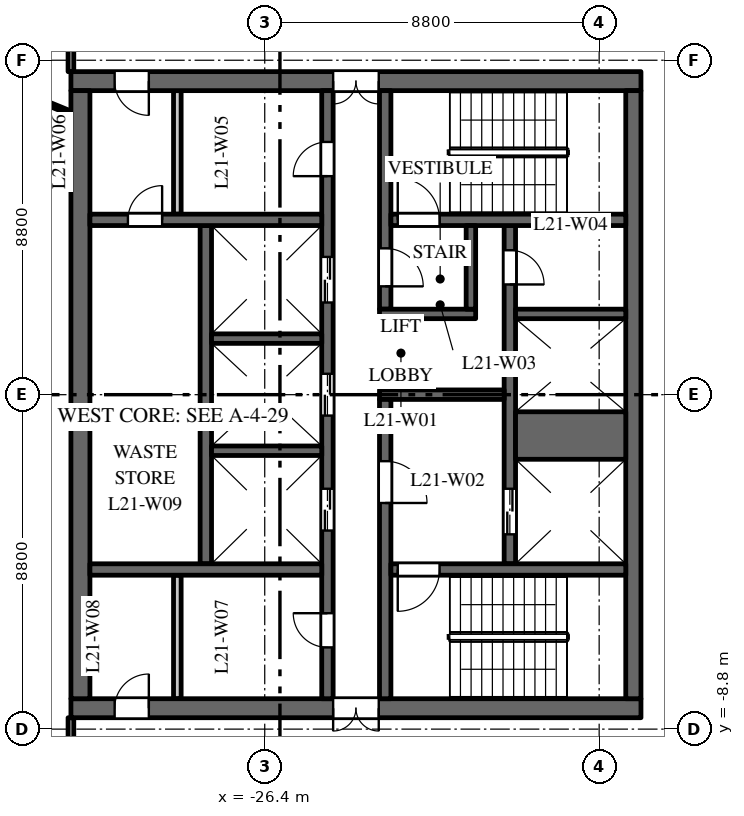
"""IFC4 building model, lengths in metres.
Left out: names, types, materials, properties, quantities, classifications, styles, units other than length and angle.
Written with IfcOpenShell. Run it as: python <this file> out.ifc"""

import sys

from ifc_helpers import new_model, si_unit, direction, frame, frame_2d, origin, place, context, subcontext, project, spatial, rectangle, extrude, element, fill, save


model = new_model("IFC4")
c1 = context("Model", 3, precision=1e-05, world=origin(), true_north=direction((0.0, 1.0)))
c2 = subcontext(c1, "Body", "Model", "MODEL_VIEW")
j1 = project(units=[si_unit("LENGTHUNIT", "METRE"), si_unit("PLANEANGLEUNIT", "RADIAN")], contexts=[c1])
p1 = place(None, origin())
s1 = spatial("IfcSite", under=j1, at=p1, CompositionType="ELEMENT")
p2 = place(p1, origin())
s2 = spatial("IfcBuilding", under=s1, at=p2, CompositionType="ELEMENT")
p3 = place(p2, frame((0.0, 0.0, 96.0)))
s3 = spatial("IfcBuildingStorey", under=s2, at=p3, CompositionType="ELEMENT", Elevation=96.0)
p4 = place(p3, frame((-16.5, 8.25, 0.0), z_axis=(0.0, 0.0, 1.0), x_axis=(-1.0, 0.0, 0.0)))
e1 = element("IfcWall", 1, at=p4, inside=s3, PredefinedType="SHEAR", context=c2, shape_type="SweptSolid", body=[
    extrude(rectangle(XDim=15.0, YDim=0.5, at=frame_2d((7.5, 0.0))), origin(), (0.0, 0.0, 1.0), 3.7),
])
p5 = place(p4, frame((6.9, 0.0, 0.0)))
e2 = element("IfcOpeningElement", 2, at=p5, cuts=e1, PredefinedType="OPENING", context=c2, shape_type="SweptSolid", body=[
    extrude(rectangle(XDim=1.2, YDim=2.1, at=frame_2d((0.6, 1.05))), frame((0.0, 0.26, 0.0), z_axis=(0.0, -1.0, 0.0), x_axis=(1.0, 0.0, 0.0)), (0.0, 0.0, 1.0), 0.52),
])
p6 = place(p4, frame((12.95, 0.0, 0.0)))
e3 = element("IfcOpeningElement", 3, at=p6, cuts=e1, PredefinedType="OPENING", context=c2, shape_type="SweptSolid", body=[
    extrude(rectangle(XDim=0.9, YDim=2.1, at=frame_2d((0.45, 1.05))), frame((0.0, 0.26, 0.0), z_axis=(0.0, -1.0, 0.0), x_axis=(1.0, 0.0, 0.0)), (0.0, 0.0, 1.0), 0.52),
])
p7 = place(p3, frame((-16.5, -8.25, 0.0), z_axis=(0.0, 0.0, 1.0), x_axis=(-1.0, 0.0, 0.0)))
e4 = element("IfcWall", 4, at=p7, inside=s3, PredefinedType="SHEAR", context=c2, shape_type="SweptSolid", body=[
    extrude(rectangle(XDim=15.0, YDim=0.5, at=frame_2d((7.5, 0.0))), origin(), (0.0, 0.0, 1.0), 3.7),
])
p8 = place(p7, frame((6.9, 0.0, 0.0)))
e5 = element("IfcOpeningElement", 5, at=p8, cuts=e4, PredefinedType="OPENING", context=c2, shape_type="SweptSolid", body=[
    extrude(rectangle(XDim=1.2, YDim=2.1, at=frame_2d((0.6, 1.05))), frame((0.0, 0.26, 0.0), z_axis=(0.0, -1.0, 0.0), x_axis=(1.0, 0.0, 0.0)), (0.0, 0.0, 1.0), 0.52),
])
p9 = place(p7, frame((12.95, 0.0, 0.0)))
e6 = element("IfcOpeningElement", 6, at=p9, cuts=e4, PredefinedType="OPENING", context=c2, shape_type="SweptSolid", body=[
    extrude(rectangle(XDim=0.9, YDim=2.1, at=frame_2d((0.45, 1.05))), frame((0.0, 0.26, 0.0), z_axis=(0.0, -1.0, 0.0), x_axis=(1.0, 0.0, 0.0)), (0.0, 0.0, 1.0), 0.52),
])
p10 = place(p3, frame((-27.95, -4.45, 0.0), z_axis=(0.0, 0.0, 1.0), x_axis=(0.0, 1.0, 0.0)))
e7 = element("IfcWall", 7, at=p10, inside=s3, PredefinedType="SHEAR", context=c2, shape_type="SweptSolid", body=[
    extrude(rectangle(XDim=8.9, YDim=0.3, at=frame_2d((4.45, 0.0))), origin(), (0.0, 0.0, 1.0), 3.7),
])
p11 = place(p3, frame((-19.95, -4.45, 0.0), z_axis=(0.0, 0.0, 1.0), x_axis=(0.0, 1.0, 0.0)))
e8 = element("IfcWall", 8, at=p11, inside=s3, PredefinedType="SHEAR", context=c2, shape_type="SweptSolid", body=[
    extrude(rectangle(XDim=8.9, YDim=0.3, at=frame_2d((4.45, 0.0))), origin(), (0.0, 0.0, 1.0), 3.7),
])
p12 = place(p11, frame((0.775, 0.0, 0.0)))
e9 = element("IfcOpeningElement", 9, at=p12, cuts=e8, PredefinedType="OPENING", context=c2, shape_type="SweptSolid", body=[
    extrude(rectangle(XDim=1.2, YDim=2.1, at=frame_2d((0.6, 1.05))), frame((0.0, 0.16, 0.0), z_axis=(0.0, -1.0, 0.0), x_axis=(1.0, 0.0, 0.0)), (0.0, 0.0, 1.0), 0.32),
])
p13 = place(p11, frame((7.35, 0.0, 0.0)))
e10 = element("IfcOpeningElement", 10, at=p13, cuts=e8, PredefinedType="OPENING", context=c2, shape_type="SweptSolid", body=[
    extrude(rectangle(XDim=0.9, YDim=2.1, at=frame_2d((0.45, 1.05))), frame((0.0, 0.16, 0.0), z_axis=(0.0, -1.0, 0.0), x_axis=(1.0, 0.0, 0.0)), (0.0, 0.0, 1.0), 0.32),
])
p14 = place(p3, frame((-24.75, -8.0, 0.0), z_axis=(0.0, 0.0, 1.0), x_axis=(0.0, 1.0, 0.0)))
e11 = element("IfcWall", 11, at=p14, inside=s3, PredefinedType="SHEAR", context=c2, shape_type="SweptSolid", body=[
    extrude(rectangle(XDim=16.0, YDim=0.3, at=frame_2d((8.0, 0.0))), origin(), (0.0, 0.0, 1.0), 3.7),
])
p15 = place(p14, frame((4.425, 0.0, 0.0)))
e12 = element("IfcOpeningElement", 12, at=p15, cuts=e11, PredefinedType="OPENING", context=c2, shape_type="SweptSolid", body=[
    extrude(rectangle(XDim=1.1, YDim=2.1, at=frame_2d((0.55, 1.05))), frame((0.0, 0.16, 0.0), z_axis=(0.0, -1.0, 0.0), x_axis=(1.0, 0.0, 0.0)), (0.0, 0.0, 1.0), 0.32),
])
p16 = place(p14, frame((7.45, 0.0, 0.0)))
e13 = element("IfcOpeningElement", 13, at=p16, cuts=e11, PredefinedType="OPENING", context=c2, shape_type="SweptSolid", body=[
    extrude(rectangle(XDim=1.1, YDim=2.1, at=frame_2d((0.55, 1.05))), frame((0.0, 0.16, 0.0), z_axis=(0.0, -1.0, 0.0), x_axis=(1.0, 0.0, 0.0)), (0.0, 0.0, 1.0), 0.32),
])
p17 = place(p14, frame((10.425, 0.0, 0.0)))
e14 = element("IfcOpeningElement", 14, at=p17, cuts=e11, PredefinedType="OPENING", context=c2, shape_type="SweptSolid", body=[
    extrude(rectangle(XDim=1.2, YDim=2.1, at=frame_2d((0.6, 1.05))), frame((0.0, 0.16, 0.0), z_axis=(0.0, -1.0, 0.0), x_axis=(1.0, 0.0, 0.0)), (0.0, 0.0, 1.0), 0.32),
])
p18 = place(p14, frame((13.75, 0.0, 0.0)))
e15 = element("IfcOpeningElement", 15, at=p18, cuts=e11, PredefinedType="OPENING", context=c2, shape_type="SweptSolid", body=[
    extrude(rectangle(XDim=0.9, YDim=2.1, at=frame_2d((0.45, 1.05))), frame((0.0, 0.16, 0.0), z_axis=(0.0, -1.0, 0.0), x_axis=(1.0, 0.0, 0.0)), (0.0, 0.0, 1.0), 0.32),
])
p19 = place(p14, frame((1.35, 0.0, 0.0)))
e16 = element("IfcOpeningElement", 16, at=p19, cuts=e11, PredefinedType="OPENING", context=c2, shape_type="SweptSolid", body=[
    extrude(rectangle(XDim=0.9, YDim=2.1, at=frame_2d((0.45, 1.05))), frame((0.0, 0.16, 0.0), z_axis=(0.0, -1.0, 0.0), x_axis=(1.0, 0.0, 0.0)), (0.0, 0.0, 1.0), 0.32),
])
p20 = place(p3, frame((-20.1, 0.0, 0.0), z_axis=(0.0, 0.0, 1.0), x_axis=(-1.0, 0.0, 0.0)))
e17 = element("IfcWall", 17, at=p20, inside=s3, PredefinedType="SHEAR", context=c2, shape_type="SweptSolid", body=[
    extrude(rectangle(XDim=3.28, YDim=0.25, at=frame_2d((1.64, 0.0))), origin(), (0.0, 0.0, 1.0), 3.7),
])
p21 = place(p3, frame((-16.7, -8.0, 0.0), z_axis=(0.0, 0.0, 1.0), x_axis=(0.0, 1.0, 0.0)))
e18 = element("IfcWall", 18, at=p21, inside=s3, PredefinedType="SHEAR", context=c2, shape_type="SweptSolid", body=[
    extrude(rectangle(XDim=16.0, YDim=0.4, at=frame_2d((8.0, 0.0))), origin(), (0.0, 0.0, 1.0), 3.7),
])
p22 = place(p3, frame((-31.25, -8.0, 0.0), z_axis=(0.0, 0.0, 1.0), x_axis=(0.0, 1.0, 0.0)))
e19 = element("IfcWall", 19, at=p22, inside=s3, PredefinedType="SHEAR", context=c2, shape_type="SweptSolid", body=[
    extrude(rectangle(XDim=16.0, YDim=0.5, at=frame_2d((8.0, 0.0))), origin(), (0.0, 0.0, 1.0), 3.7),
])
p23 = place(p3, frame((-24.9, 4.6, 0.0), z_axis=(0.0, 0.0, 1.0), x_axis=(-1.0, 0.0, 0.0)))
e20 = element("IfcWall", 20, at=p23, inside=s3, PredefinedType="SHEAR", context=c2, shape_type="SweptSolid", body=[
    extrude(rectangle(XDim=6.1, YDim=0.3, at=frame_2d((3.05, 0.0))), origin(), (0.0, 0.0, 1.0), 3.7),
])
p24 = place(p23, frame((4.2, 0.0, 0.0)))
e21 = element("IfcOpeningElement", 21, at=p24, cuts=e20, PredefinedType="OPENING", context=c2, shape_type="SweptSolid", body=[
    extrude(rectangle(XDim=0.9, YDim=2.1, at=frame_2d((0.45, 1.05))), frame((0.0, 0.16, 0.0), z_axis=(0.0, -1.0, 0.0), x_axis=(1.0, 0.0, 0.0)), (0.0, 0.0, 1.0), 0.32),
])
for number, where, z_axis, x_axis in (
    (22, (-28.7, 4.75, 0.0), (0.0, 0.0, 1.0), (0.0, 1.0, 0.0)),
    (23, (-28.7, -8.0, 0.0), (0.0, 0.0, 1.0), (0.0, 1.0, 0.0)),
):
    element("IfcWall", number, at=place(p3, frame(where, z_axis=z_axis, x_axis=x_axis)), inside=s3, PredefinedType="PARTITIONING", context=c2, shape_type="SweptSolid", body=[
        extrude(rectangle(XDim=3.25, YDim=0.2, at=frame_2d((1.625, 0.0))), origin(), (0.0, 0.0, 1.0), 3.7),
    ])
p25 = place(p3, frame((-24.9, -4.6, 0.0), z_axis=(0.0, 0.0, 1.0), x_axis=(-1.0, 0.0, 0.0)))
e24 = element("IfcWall", 24, at=p25, inside=s3, PredefinedType="SHEAR", context=c2, shape_type="SweptSolid", body=[
    extrude(rectangle(XDim=6.1, YDim=0.3, at=frame_2d((3.05, 0.0))), origin(), (0.0, 0.0, 1.0), 3.7),
])
p26 = place(p3, frame((-16.9, -1.075, 0.0), z_axis=(0.0, 0.0, 1.0), x_axis=(-1.0, 0.0, 0.0)))
e25 = element("IfcWall", 25, at=p26, inside=s3, PredefinedType="SHEAR", context=c2, shape_type="SweptSolid", body=[
    extrude(rectangle(XDim=2.9, YDim=1.25, at=frame_2d((1.45, 0.0))), origin(), (0.0, 0.0, 1.0), 3.7),
])
for number, where, z_axis, x_axis in (
    (26, (-16.9, 2.125, 0.0), (0.0, 0.0, 1.0), (-1.0, 0.0, 0.0)),
    (27, (-24.9, -1.475, 0.0), (0.0, 0.0, 1.0), (-1.0, 0.0, 0.0)),
    (28, (-24.9, 1.475, 0.0), (0.0, 0.0, 1.0), (-1.0, 0.0, 0.0)),
):
    element("IfcWall", number, at=place(p3, frame(where, z_axis=z_axis, x_axis=x_axis)), inside=s3, PredefinedType="SHEAR", context=c2, shape_type="SweptSolid", body=[
        extrude(rectangle(XDim=2.9, YDim=0.25, at=frame_2d((1.45, 0.0))), origin(), (0.0, 0.0, 1.0), 3.7),
    ])
p27 = place(p3, frame((-23.23, 2.25, 0.0), z_axis=(0.0, 0.0, 1.0), x_axis=(0.0, 1.0, 0.0)))
e29 = element("IfcWall", 29, at=p27, inside=s3, PredefinedType="SHEAR", context=c2, shape_type="SweptSolid", body=[
    extrude(rectangle(XDim=5.75, YDim=0.3, at=frame_2d((2.875, 0.0))), origin(), (0.0, 0.0, 1.0), 3.7),
])
p28 = place(p27, frame((0.6, 0.0, 0.0)))
e30 = element("IfcOpeningElement", 30, at=p28, cuts=e29, PredefinedType="OPENING", context=c2, shape_type="SweptSolid", body=[
    extrude(rectangle(XDim=1.0, YDim=2.1, at=frame_2d((0.5, 1.05))), frame((0.0, 0.16, 0.0), z_axis=(0.0, -1.0, 0.0), x_axis=(1.0, 0.0, 0.0)), (0.0, 0.0, 1.0), 0.32),
])
p29 = place(p3, frame((-23.23, -8.0, 0.0), z_axis=(0.0, 0.0, 1.0), x_axis=(0.0, 1.0, 0.0)))
e31 = element("IfcWall", 31, at=p29, inside=s3, PredefinedType="SHEAR", context=c2, shape_type="SweptSolid", body=[
    extrude(rectangle(XDim=7.875, YDim=0.3, at=frame_2d((3.938, 0.0))), origin(), (0.0, 0.0, 1.0), 3.7),
])
p30 = place(p29, frame((5.15, 0.0, 0.0)))
e32 = element("IfcOpeningElement", 32, at=p30, cuts=e31, PredefinedType="OPENING", context=c2, shape_type="SweptSolid", body=[
    extrude(rectangle(XDim=1.1, YDim=2.1, at=frame_2d((0.55, 1.05))), frame((0.0, 0.16, 0.0), z_axis=(0.0, -1.0, 0.0), x_axis=(1.0, 0.0, 0.0)), (0.0, 0.0, 1.0), 0.32),
])
p31 = place(p3, frame((-16.9, 4.6, 0.0), z_axis=(0.0, 0.0, 1.0), x_axis=(-1.0, 0.0, 0.0)))
e33 = element("IfcWall", 33, at=p31, inside=s3, PredefinedType="SHEAR", context=c2, shape_type="SweptSolid", body=[
    extrude(rectangle(XDim=6.18, YDim=0.3, at=frame_2d((3.09, 0.0))), origin(), (0.0, 0.0, 1.0), 3.7),
])
p32 = place(p31, frame((4.9, 0.0, 0.0)))
e34 = element("IfcOpeningElement", 34, at=p32, cuts=e33, PredefinedType="OPENING", context=c2, shape_type="SweptSolid", body=[
    extrude(rectangle(XDim=1.1, YDim=2.1, at=frame_2d((0.55, 1.05))), frame((0.0, 0.16, 0.0), z_axis=(0.0, -1.0, 0.0), x_axis=(1.0, 0.0, 0.0)), (0.0, 0.0, 1.0), 0.32),
])
p33 = place(p3, frame((-16.9, -4.6, 0.0), z_axis=(0.0, 0.0, 1.0), x_axis=(-1.0, 0.0, 0.0)))
e35 = element("IfcWall", 35, at=p33, inside=s3, PredefinedType="SHEAR", context=c2, shape_type="SweptSolid", body=[
    extrude(rectangle(XDim=6.18, YDim=0.3, at=frame_2d((3.09, 0.0))), origin(), (0.0, 0.0, 1.0), 3.7),
])
p34 = place(p33, frame((4.9, 0.0, 0.0)))
e36 = element("IfcOpeningElement", 36, at=p34, cuts=e35, PredefinedType="OPENING", context=c2, shape_type="SweptSolid", body=[
    extrude(rectangle(XDim=1.1, YDim=2.1, at=frame_2d((0.55, 1.05))), frame((0.0, 0.16, 0.0), z_axis=(0.0, -1.0, 0.0), x_axis=(1.0, 0.0, 0.0)), (0.0, 0.0, 1.0), 0.32),
])
p35 = place(p3, frame((-20.85, 2.125, 0.0), z_axis=(0.0, 0.0, 1.0), x_axis=(-1.0, 0.0, 0.0)))
e37 = element("IfcWall", 37, at=p35, inside=s3, PredefinedType="SHEAR", context=c2, shape_type="SweptSolid", body=[
    extrude(rectangle(XDim=2.53, YDim=0.25, at=frame_2d((1.265, 0.0))), origin(), (0.0, 0.0, 1.0), 3.7),
])
p36 = place(p3, frame((-20.975, 2.25, 0.0), z_axis=(0.0, 0.0, 1.0), x_axis=(0.0, 1.0, 0.0)))
e38 = element("IfcWall", 38, at=p36, inside=s3, PredefinedType="SHEAR", context=c2, shape_type="SweptSolid", body=[
    extrude(rectangle(XDim=2.2, YDim=0.25, at=frame_2d((1.1, 0.0))), origin(), (0.0, 0.0, 1.0), 3.7),
])
p37 = place(p3, frame((-34.234, 8.53, 0.0), z_axis=(0.0, 0.0, 1.0), x_axis=(0.925344112436, -0.379128307542, 0.0)))
e39 = element("IfcWall", 39, at=p37, inside=s3, PredefinedType="PARTITIONING", context=c2, shape_type="SweptSolid", body=[
    extrude(rectangle(XDim=2.954, YDim=0.1, at=frame_2d((1.477, 0.0))), origin(), (0.0, 0.0, 1.0), 2.9),
])
for number, where, z_axis, x_axis in (
    (40, (-31.5, -10.7, 0.0), (0.0, 0.0, 1.0), (0.0, 1.0, 0.0)),
    (41, (-31.5, 8.5, 0.0), (0.0, 0.0, 1.0), (0.0, 1.0, 0.0)),
):
    element("IfcWall", number, at=place(p3, frame(where, z_axis=z_axis, x_axis=x_axis)), inside=s3, PredefinedType="PARTITIONING", context=c2, shape_type="SweptSolid", body=[
        extrude(rectangle(XDim=2.2, YDim=0.15, at=frame_2d((1.1, 0.0))), origin(), (0.0, 0.0, 1.0), 3.7),
    ])
p38 = place(p12, origin())
e42 = element("IfcDoor", 42, at=p38, inside=s3, OperationType="DOUBLE_DOOR_SLIDING", PredefinedType="DOOR", context=c2, shape_type="SweptSolid", body=[
    extrude(rectangle(XDim=1.2, YDim=2.1, at=frame_2d((0.6, 1.05))), frame((0.0, 0.025, 0.0), z_axis=(0.0, -1.0, 0.0), x_axis=(1.0, 0.0, 0.0)), (0.0, 0.0, 1.0), 0.05),
])
fill(e9, e42)
p39 = place(p15, origin())
e43 = element("IfcDoor", 43, at=p39, inside=s3, OperationType="DOUBLE_DOOR_SLIDING", PredefinedType="DOOR", context=c2, shape_type="SweptSolid", body=[
    extrude(rectangle(XDim=1.1, YDim=2.1, at=frame_2d((0.55, 1.05))), frame((0.0, 0.025, 0.0), z_axis=(0.0, -1.0, 0.0), x_axis=(1.0, 0.0, 0.0)), (0.0, 0.0, 1.0), 0.05),
])
fill(e12, e43)
p40 = place(p16, origin())
e44 = element("IfcDoor", 44, at=p40, inside=s3, OperationType="DOUBLE_DOOR_SLIDING", PredefinedType="DOOR", context=c2, shape_type="SweptSolid", body=[
    extrude(rectangle(XDim=1.1, YDim=2.1, at=frame_2d((0.55, 1.05))), frame((0.0, 0.025, 0.0), z_axis=(0.0, -1.0, 0.0), x_axis=(1.0, 0.0, 0.0)), (0.0, 0.0, 1.0), 0.05),
])
fill(e13, e44)
p41 = place(p17, origin())
e45 = element("IfcDoor", 45, at=p41, inside=s3, OperationType="DOUBLE_DOOR_SLIDING", PredefinedType="DOOR", context=c2, shape_type="SweptSolid", body=[
    extrude(rectangle(XDim=1.2, YDim=2.1, at=frame_2d((0.6, 1.05))), frame((0.0, 0.025, 0.0), z_axis=(0.0, -1.0, 0.0), x_axis=(1.0, 0.0, 0.0)), (0.0, 0.0, 1.0), 0.05),
])
fill(e14, e45)
p42 = place(p32, origin())
e46 = element("IfcDoor", 46, at=p42, inside=s3, OperationType="SINGLE_SWING_RIGHT", PredefinedType="DOOR", context=c2, shape_type="SweptSolid", body=[
    extrude(rectangle(XDim=1.1, YDim=2.1, at=frame_2d((0.55, 1.05))), frame((0.0, 0.025, 0.0), z_axis=(0.0, -1.0, 0.0), x_axis=(1.0, 0.0, 0.0)), (0.0, 0.0, 1.0), 0.05),
])
fill(e34, e46)
p43 = place(p34, origin())
e47 = element("IfcDoor", 47, at=p43, inside=s3, OperationType="SINGLE_SWING_LEFT", PredefinedType="DOOR", context=c2, shape_type="SweptSolid", body=[
    extrude(rectangle(XDim=1.1, YDim=2.1, at=frame_2d((0.55, 1.05))), frame((0.0, 0.025, 0.0), z_axis=(0.0, -1.0, 0.0), x_axis=(1.0, 0.0, 0.0)), (0.0, 0.0, 1.0), 0.05),
])
fill(e36, e47)
p44 = place(p30, origin())
e48 = element("IfcDoor", 48, at=p44, inside=s3, OperationType="SINGLE_SWING_LEFT", PredefinedType="DOOR", context=c2, shape_type="SweptSolid", body=[
    extrude(rectangle(XDim=1.1, YDim=2.1, at=frame_2d((0.55, 1.05))), frame((0.0, 0.025, 0.0), z_axis=(0.0, -1.0, 0.0), x_axis=(1.0, 0.0, 0.0)), (0.0, 0.0, 1.0), 0.05),
])
fill(e32, e48)
p45 = place(p28, origin())
e49 = element("IfcDoor", 49, at=p45, inside=s3, OperationType="SINGLE_SWING_LEFT", PredefinedType="DOOR", context=c2, shape_type="SweptSolid", body=[
    extrude(rectangle(XDim=1.0, YDim=2.1, at=frame_2d((0.5, 1.05))), frame((0.0, 0.025, 0.0), z_axis=(0.0, -1.0, 0.0), x_axis=(1.0, 0.0, 0.0)), (0.0, 0.0, 1.0), 0.05),
])
fill(e30, e49)
p46 = place(p5, origin())
e50 = element("IfcDoor", 50, at=p46, inside=s3, OperationType="DOUBLE_DOOR_DOUBLE_SWING", PredefinedType="DOOR", context=c2, shape_type="SweptSolid", body=[
    extrude(rectangle(XDim=1.2, YDim=2.1, at=frame_2d((0.6, 1.05))), frame((0.0, 0.025, 0.0), z_axis=(0.0, -1.0, 0.0), x_axis=(1.0, 0.0, 0.0)), (0.0, 0.0, 1.0), 0.05),
])
fill(e2, e50)
p47 = place(p8, origin())
e51 = element("IfcDoor", 51, at=p47, inside=s3, OperationType="DOUBLE_DOOR_DOUBLE_SWING", PredefinedType="DOOR", context=c2, shape_type="SweptSolid", body=[
    extrude(rectangle(XDim=1.2, YDim=2.1, at=frame_2d((0.6, 1.05))), frame((0.0, 0.025, 0.0), z_axis=(0.0, -1.0, 0.0), x_axis=(1.0, 0.0, 0.0)), (0.0, 0.0, 1.0), 0.05),
])
fill(e5, e51)
p48 = place(p13, origin())
e52 = element("IfcDoor", 52, at=p48, inside=s3, OperationType="SINGLE_SWING_LEFT", PredefinedType="DOOR", context=c2, shape_type="SweptSolid", body=[
    extrude(rectangle(XDim=0.9, YDim=2.1, at=frame_2d((0.45, 1.05))), frame((0.0, 0.025, 0.0), z_axis=(0.0, -1.0, 0.0), x_axis=(1.0, 0.0, 0.0)), (0.0, 0.0, 1.0), 0.05),
])
fill(e10, e52)
p49 = place(p18, origin())
e53 = element("IfcDoor", 53, at=p49, inside=s3, OperationType="SINGLE_SWING_RIGHT", PredefinedType="DOOR", context=c2, shape_type="SweptSolid", body=[
    extrude(rectangle(XDim=0.9, YDim=2.1, at=frame_2d((0.45, 1.05))), frame((0.0, 0.025, 0.0), z_axis=(0.0, -1.0, 0.0), x_axis=(1.0, 0.0, 0.0)), (0.0, 0.0, 1.0), 0.05),
])
fill(e15, e53)
p50 = place(p6, origin())
e54 = element("IfcDoor", 54, at=p50, inside=s3, OperationType="SINGLE_SWING_RIGHT", PredefinedType="DOOR", context=c2, shape_type="SweptSolid", body=[
    extrude(rectangle(XDim=0.9, YDim=2.1, at=frame_2d((0.45, 1.05))), frame((0.0, 0.025, 0.0), z_axis=(0.0, -1.0, 0.0), x_axis=(1.0, 0.0, 0.0)), (0.0, 0.0, 1.0), 0.05),
])
fill(e3, e54)
p51 = place(p19, origin())
e55 = element("IfcDoor", 55, at=p51, inside=s3, OperationType="SINGLE_SWING_LEFT", PredefinedType="DOOR", context=c2, shape_type="SweptSolid", body=[
    extrude(rectangle(XDim=0.9, YDim=2.1, at=frame_2d((0.45, 1.05))), frame((0.0, 0.025, 0.0), z_axis=(0.0, -1.0, 0.0), x_axis=(1.0, 0.0, 0.0)), (0.0, 0.0, 1.0), 0.05),
])
fill(e16, e55)
p52 = place(p9, origin())
e56 = element("IfcDoor", 56, at=p52, inside=s3, OperationType="SINGLE_SWING_LEFT", PredefinedType="DOOR", context=c2, shape_type="SweptSolid", body=[
    extrude(rectangle(XDim=0.9, YDim=2.1, at=frame_2d((0.45, 1.05))), frame((0.0, 0.025, 0.0), z_axis=(0.0, -1.0, 0.0), x_axis=(1.0, 0.0, 0.0)), (0.0, 0.0, 1.0), 0.05),
])
fill(e6, e56)
p53 = place(p24, origin())
e57 = element("IfcDoor", 57, at=p53, inside=s3, OperationType="SINGLE_SWING_LEFT", PredefinedType="DOOR", context=c2, shape_type="SweptSolid", body=[
    extrude(rectangle(XDim=0.9, YDim=2.1, at=frame_2d((0.45, 1.05))), frame((0.0, 0.025, 0.0), z_axis=(0.0, -1.0, 0.0), x_axis=(1.0, 0.0, 0.0)), (0.0, 0.0, 1.0), 0.05),
])
fill(e21, e57)
save(model, sys.argv[1])
